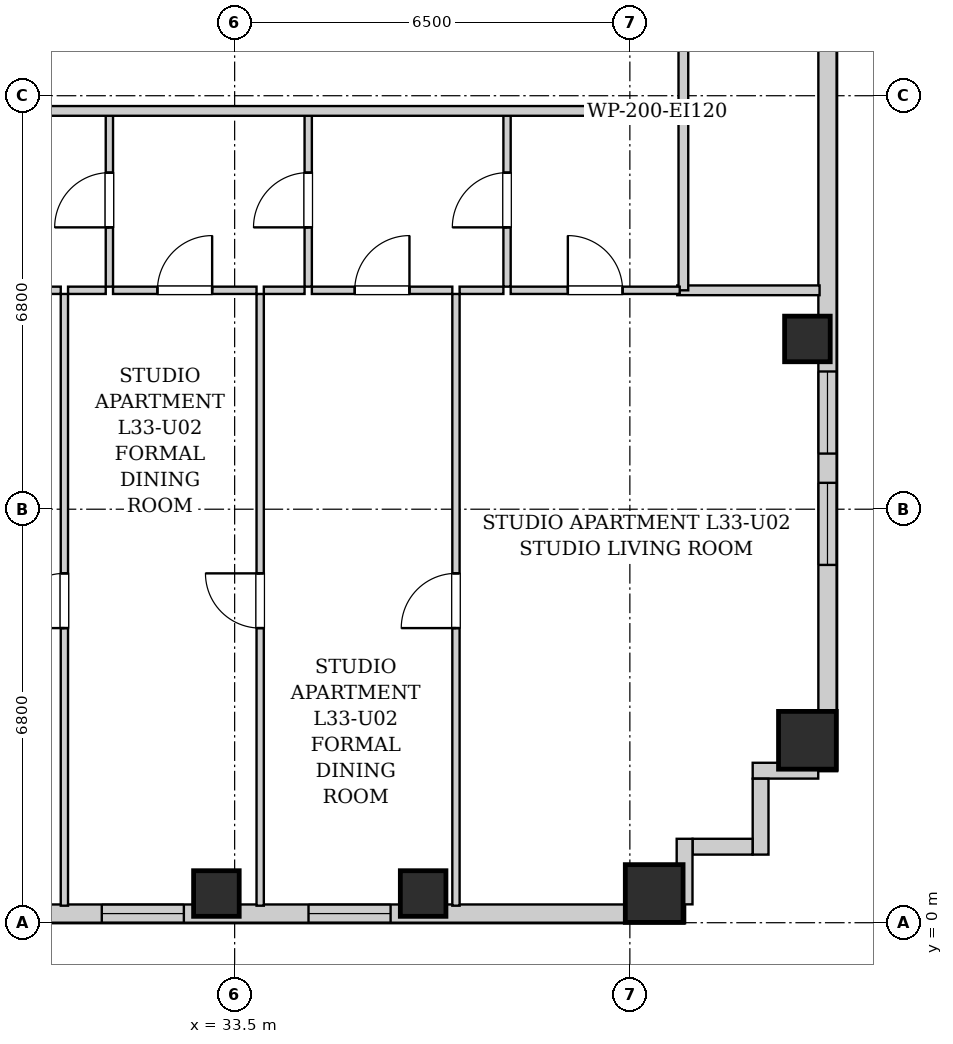
"""IFC4 building model, lengths in metres.
Left out: names, types, materials, properties, quantities, classifications, styles, units other than length and angle.
Written with IfcOpenShell. Run it as: python <this file> out.ifc"""

import sys

from ifc_helpers import new_model, si_unit, direction, frame, frame_2d, origin, origin_2d, place, context, subcontext, project, spatial, rectangle, extrude, element, fill, save


model = new_model("IFC4")
c1 = context("Model", 3, precision=1e-05, world=origin(), true_north=direction((0.0, 1.0)))
c2 = subcontext(c1, "Body", "Model", "MODEL_VIEW")
j1 = project(units=[si_unit("LENGTHUNIT", "METRE"), si_unit("PLANEANGLEUNIT", "RADIAN")], contexts=[c1])
p1 = place(None, origin())
s1 = spatial("IfcSite", under=j1, at=p1, CompositionType="ELEMENT")
p2 = place(p1, origin())
s2 = spatial("IfcBuilding", under=s1, at=p2, CompositionType="ELEMENT")
p3 = place(p2, frame((0.0, 0.0, 116.7)))
s3 = spatial("IfcBuildingStorey", under=s2, at=p3, CompositionType="ELEMENT", Elevation=116.7)
for number, where, z_axis, x_axis in (
    (1, (33.2, 0.48, 0.0), (0.0, 0.0, 1.0), (1.0, 0.0, 0.0)),
    (2, (36.6, 0.48, 0.0), (0.0, 0.0, 1.0), (1.0, 0.0, 0.0)),
):
    element("IfcColumn", number, at=place(p3, frame(where, z_axis=z_axis, x_axis=x_axis)), inside=s3, PredefinedType="COLUMN", context=c2, shape_type="SweptSolid", body=[
        extrude(rectangle(XDim=0.75, YDim=0.75, at=origin_2d()), origin(), (0.0, 0.0, 1.0), 3.2),
    ])
for number, where, z_axis, x_axis in (
    (3, (40.4, 0.48, 0.0), (0.0, 0.0, 1.0), (1.0, 0.0, 0.0)),
    (4, (42.92, 3.0, 0.0), (0.0, 0.0, 1.0), (1.0, 0.0, 0.0)),
):
    element("IfcColumn", number, at=place(p3, frame(where, z_axis=z_axis, x_axis=x_axis)), inside=s3, PredefinedType="COLUMN", context=c2, shape_type="SweptSolid", body=[
        extrude(rectangle(XDim=0.95, YDim=0.95, at=origin_2d()), origin(), (0.0, 0.0, 1.0), 3.2),
    ])
p4 = place(p3, frame((42.92, 9.6, 0.0), z_axis=(0.0, 0.0, 1.0), x_axis=(1.0, 0.0, 0.0)))
e5 = element("IfcColumn", 5, at=p4, inside=s3, PredefinedType="COLUMN", context=c2, shape_type="SweptSolid", body=[
    extrude(rectangle(XDim=0.75, YDim=0.75, at=origin_2d()), origin(), (0.0, 0.0, 1.0), 3.2),
])
p5 = place(p3, frame((43.25, 24.6, 0.0), z_axis=(0.0, 0.0, 1.0), x_axis=(0.0, -1.0, 0.0)))
e6 = element("IfcWall", 6, at=p5, inside=s3, PredefinedType="SOLIDWALL", context=c2, shape_type="SweptSolid", body=[
    extrude(rectangle(XDim=22.1, YDim=0.3, at=frame_2d((11.05, 0.0))), origin(), (0.0, 0.0, 1.0), 2.88),
])
p6 = place(p5, frame((17.366, 0.0, 0.55)))
e7 = element("IfcOpeningElement", 7, at=p6, cuts=e6, PredefinedType="OPENING", context=c2, shape_type="SweptSolid", body=[
    extrude(rectangle(XDim=1.35, YDim=1.2, at=frame_2d((0.675, 0.6))), frame((0.0, 0.16, 0.0), z_axis=(0.0, -1.0, 0.0), x_axis=(1.0, 0.0, 0.0)), (0.0, 0.0, 1.0), 0.32),
])
p7 = place(p5, frame((15.535, 0.0, 0.55)))
e8 = element("IfcOpeningElement", 8, at=p7, cuts=e6, PredefinedType="OPENING", context=c2, shape_type="SweptSolid", body=[
    extrude(rectangle(XDim=1.35, YDim=1.2, at=frame_2d((0.675, 0.6))), frame((0.0, 0.16, 0.0), z_axis=(0.0, -1.0, 0.0), x_axis=(1.0, 0.0, 0.0)), (0.0, 0.0, 1.0), 0.32),
])
p8 = place(p5, frame((5.1, 0.0, 0.55)))
e9 = element("IfcOpeningElement", 9, at=p8, cuts=e6, PredefinedType="OPENING", context=c2, shape_type="SweptSolid", body=[
    extrude(rectangle(XDim=1.35, YDim=1.2, at=frame_2d((0.675, 0.6))), frame((0.0, 0.16, 0.0), z_axis=(0.0, -1.0, 0.0), x_axis=(1.0, 0.0, 0.0)), (0.0, 0.0, 1.0), 0.32),
])
p9 = place(p5, frame((6.71, 0.0, 0.55)))
e10 = element("IfcOpeningElement", 10, at=p9, cuts=e6, PredefinedType="OPENING", context=c2, shape_type="SweptSolid", body=[
    extrude(rectangle(XDim=1.35, YDim=1.2, at=frame_2d((0.675, 0.6))), frame((0.0, 0.16, 0.0), z_axis=(0.0, -1.0, 0.0), x_axis=(1.0, 0.0, 0.0)), (0.0, 0.0, 1.0), 0.32),
])
p10 = place(p3, frame((40.9, 0.15, 0.0), z_axis=(0.0, 0.0, 1.0), x_axis=(-1.0, 0.0, 0.0)))
e11 = element("IfcWall", 11, at=p10, inside=s3, PredefinedType="SOLIDWALL", context=c2, shape_type="SweptSolid", body=[
    extrude(rectangle(XDim=21.95, YDim=0.3, at=frame_2d((10.975, 0.0))), origin(), (0.0, 0.0, 1.0), 2.88),
])
p11 = place(p10, frame((20.08, 0.0, 0.55)))
e12 = element("IfcOpeningElement", 12, at=p11, cuts=e11, PredefinedType="OPENING", context=c2, shape_type="SweptSolid", body=[
    extrude(rectangle(XDim=1.35, YDim=1.2, at=frame_2d((0.675, 0.6))), frame((0.0, 0.16, 0.0), z_axis=(0.0, -1.0, 0.0), x_axis=(1.0, 0.0, 0.0)), (0.0, 0.0, 1.0), 0.32),
])
p12 = place(p10, frame((18.4, 0.0, 0.55)))
e13 = element("IfcOpeningElement", 13, at=p12, cuts=e11, PredefinedType="OPENING", context=c2, shape_type="SweptSolid", body=[
    extrude(rectangle(XDim=0.85, YDim=1.2, at=frame_2d((0.425, 0.6))), frame((0.0, 0.16, 0.0), z_axis=(0.0, -1.0, 0.0), x_axis=(1.0, 0.0, 0.0)), (0.0, 0.0, 1.0), 0.32),
])
p13 = place(p10, frame((11.127, 0.0, 0.55)))
e14 = element("IfcOpeningElement", 14, at=p13, cuts=e11, PredefinedType="OPENING", context=c2, shape_type="SweptSolid", body=[
    extrude(rectangle(XDim=1.35, YDim=1.2, at=frame_2d((0.675, 0.6))), frame((0.0, 0.16, 0.0), z_axis=(0.0, -1.0, 0.0), x_axis=(1.0, 0.0, 0.0)), (0.0, 0.0, 1.0), 0.32),
])
p14 = place(p10, frame((8.235, 0.0, 0.55)))
e15 = element("IfcOpeningElement", 15, at=p14, cuts=e11, PredefinedType="OPENING", context=c2, shape_type="SweptSolid", body=[
    extrude(rectangle(XDim=1.35, YDim=1.2, at=frame_2d((0.675, 0.6))), frame((0.0, 0.16, 0.0), z_axis=(0.0, -1.0, 0.0), x_axis=(1.0, 0.0, 0.0)), (0.0, 0.0, 1.0), 0.32),
])
p15 = place(p10, frame((4.835, 0.0, 0.55)))
e16 = element("IfcOpeningElement", 16, at=p15, cuts=e11, PredefinedType="OPENING", context=c2, shape_type="SweptSolid", body=[
    extrude(rectangle(XDim=1.35, YDim=1.2, at=frame_2d((0.675, 0.6))), frame((0.0, 0.16, 0.0), z_axis=(0.0, -1.0, 0.0), x_axis=(1.0, 0.0, 0.0)), (0.0, 0.0, 1.0), 0.32),
])
p16 = place(p3, frame((43.098, 2.5, 0.0), z_axis=(0.0, 0.0, 1.0), x_axis=(-1.0, 0.0, 0.0)))
e17 = element("IfcWall", 17, at=p16, inside=s3, PredefinedType="SOLIDWALL", context=c2, shape_type="SweptSolid", body=[
    extrude(rectangle(XDim=1.078, YDim=0.26, at=frame_2d((0.539, 0.0))), origin(), (0.0, 0.0, 1.0), 2.88),
])
p17 = place(p3, frame((42.15, 2.368, 0.0), z_axis=(0.0, 0.0, 1.0), x_axis=(0.0, -1.0, 0.0)))
e18 = element("IfcWall", 18, at=p17, inside=s3, PredefinedType="SOLIDWALL", context=c2, shape_type="SweptSolid", body=[
    extrude(rectangle(XDim=1.248, YDim=0.26, at=frame_2d((0.624, 0.0))), origin(), (0.0, 0.0, 1.0), 2.88),
])
p18 = place(p3, frame((42.018, 1.25, 0.0), z_axis=(0.0, 0.0, 1.0), x_axis=(-1.0, 0.0, 0.0)))
e19 = element("IfcWall", 19, at=p18, inside=s3, PredefinedType="SOLIDWALL", context=c2, shape_type="SweptSolid", body=[
    extrude(rectangle(XDim=0.986, YDim=0.26, at=frame_2d((0.493, 0.0))), origin(), (0.0, 0.0, 1.0), 2.88),
])
p19 = place(p3, frame((40.9, 1.38, 0.0), z_axis=(0.0, 0.0, 1.0), x_axis=(0.0, -1.0, 0.0)))
e20 = element("IfcWall", 20, at=p19, inside=s3, PredefinedType="SOLIDWALL", context=c2, shape_type="SweptSolid", body=[
    extrude(rectangle(XDim=1.078, YDim=0.26, at=frame_2d((0.539, 0.0))), origin(), (0.0, 0.0, 1.0), 2.88),
])
p20 = place(p3, frame((40.88, 13.35, 0.0), z_axis=(0.0, 0.0, 1.0), x_axis=(0.0, 1.0, 0.0)))
e21 = element("IfcWall", 21, at=p20, inside=s3, PredefinedType="PARTITIONING", context=c2, shape_type="SweptSolid", body=[
    extrude(rectangle(XDim=1.74, YDim=0.16, at=frame_2d((0.87, 0.0))), origin(), (0.0, 0.0, 1.0), 2.88),
])
p21 = place(p3, frame((40.78, 10.4, 0.0), z_axis=(0.0, 0.0, 1.0), x_axis=(1.0, 0.0, 0.0)))
e22 = element("IfcWall", 22, at=p21, inside=s3, PredefinedType="PARTITIONING", context=c2, shape_type="SweptSolid", body=[
    extrude(rectangle(XDim=2.34, YDim=0.16, at=frame_2d((1.17, 0.0))), origin(), (0.0, 0.0, 1.0), 2.88),
])
p22 = place(p3, frame((40.88, 10.4, 0.0), z_axis=(0.0, 0.0, 1.0), x_axis=(0.0, 1.0, 0.0)))
e23 = element("IfcWall", 23, at=p22, inside=s3, PredefinedType="PARTITIONING", context=c2, shape_type="SweptSolid", body=[
    extrude(rectangle(XDim=2.91, YDim=0.16, at=frame_2d((1.455, 0.0))), origin(), (0.0, 0.0, 1.0), 2.88),
])
p23 = place(p3, frame((31.44, 10.46, 0.0), z_axis=(0.0, 0.0, 1.0), x_axis=(0.0, 1.0, 0.0)))
e24 = element("IfcWall", 24, at=p23, inside=s3, PredefinedType="PARTITIONING", context=c2, shape_type="SweptSolid", body=[
    extrude(rectangle(XDim=2.85, YDim=0.12, at=frame_2d((1.425, 0.0))), origin(), (0.0, 0.0, 1.0), 2.88),
])
p24 = place(p23, frame((0.975, 0.0, 0.0)))
e25 = element("IfcOpeningElement", 25, at=p24, cuts=e24, PredefinedType="OPENING", context=c2, shape_type="SweptSolid", body=[
    extrude(rectangle(XDim=0.9, YDim=2.05, at=frame_2d((0.45, 1.025))), frame((0.0, 0.07, 0.0), z_axis=(0.0, -1.0, 0.0), x_axis=(1.0, 0.0, 0.0)), (0.0, 0.0, 1.0), 0.14),
])
p25 = place(p3, frame((28.23, 10.4, 0.0), z_axis=(0.0, 0.0, 1.0), x_axis=(1.0, 0.0, 0.0)))
e26 = element("IfcWall", 26, at=p25, inside=s3, PredefinedType="PARTITIONING", context=c2, shape_type="SweptSolid", body=[
    extrude(rectangle(XDim=2.41, YDim=0.12, at=frame_2d((1.205, 0.0))), origin(), (0.0, 0.0, 1.0), 2.88),
])
p26 = place(p25, frame((0.755, 0.0, 0.0)))
e27 = element("IfcOpeningElement", 27, at=p26, cuts=e26, PredefinedType="OPENING", context=c2, shape_type="SweptSolid", body=[
    extrude(rectangle(XDim=0.9, YDim=2.05, at=frame_2d((0.45, 1.025))), frame((0.0, 0.07, 0.0), z_axis=(0.0, -1.0, 0.0), x_axis=(1.0, 0.0, 0.0)), (0.0, 0.0, 1.0), 0.14),
])
p27 = place(p3, frame((30.76, 10.4, 0.0), z_axis=(0.0, 0.0, 1.0), x_axis=(1.0, 0.0, 0.0)))
e28 = element("IfcWall", 28, at=p27, inside=s3, PredefinedType="PARTITIONING", context=c2, shape_type="SweptSolid", body=[
    extrude(rectangle(XDim=0.62, YDim=0.12, at=frame_2d((0.31, 0.0))), origin(), (0.0, 0.0, 1.0), 2.88),
])
p28 = place(p3, frame((34.71, 10.46, 0.0), z_axis=(0.0, 0.0, 1.0), x_axis=(0.0, 1.0, 0.0)))
e29 = element("IfcWall", 29, at=p28, inside=s3, PredefinedType="PARTITIONING", context=c2, shape_type="SweptSolid", body=[
    extrude(rectangle(XDim=2.85, YDim=0.12, at=frame_2d((1.425, 0.0))), origin(), (0.0, 0.0, 1.0), 2.88),
])
p29 = place(p28, frame((0.975, 0.0, 0.0)))
e30 = element("IfcOpeningElement", 30, at=p29, cuts=e29, PredefinedType="OPENING", context=c2, shape_type="SweptSolid", body=[
    extrude(rectangle(XDim=0.9, YDim=2.05, at=frame_2d((0.45, 1.025))), frame((0.0, 0.07, 0.0), z_axis=(0.0, -1.0, 0.0), x_axis=(1.0, 0.0, 0.0)), (0.0, 0.0, 1.0), 0.14),
])
p30 = place(p3, frame((31.5, 10.4, 0.0), z_axis=(0.0, 0.0, 1.0), x_axis=(1.0, 0.0, 0.0)))
e31 = element("IfcWall", 31, at=p30, inside=s3, PredefinedType="PARTITIONING", context=c2, shape_type="SweptSolid", body=[
    extrude(rectangle(XDim=2.36, YDim=0.12, at=frame_2d((1.18, 0.0))), origin(), (0.0, 0.0, 1.0), 2.88),
])
p31 = place(p30, frame((0.73, 0.0, 0.0)))
e32 = element("IfcOpeningElement", 32, at=p31, cuts=e31, PredefinedType="OPENING", context=c2, shape_type="SweptSolid", body=[
    extrude(rectangle(XDim=0.9, YDim=2.05, at=frame_2d((0.45, 1.025))), frame((0.0, 0.07, 0.0), z_axis=(0.0, -1.0, 0.0), x_axis=(1.0, 0.0, 0.0)), (0.0, 0.0, 1.0), 0.14),
])
p32 = place(p3, frame((33.98, 10.4, 0.0), z_axis=(0.0, 0.0, 1.0), x_axis=(1.0, 0.0, 0.0)))
e33 = element("IfcWall", 33, at=p32, inside=s3, PredefinedType="PARTITIONING", context=c2, shape_type="SweptSolid", body=[
    extrude(rectangle(XDim=0.67, YDim=0.12, at=frame_2d((0.335, 0.0))), origin(), (0.0, 0.0, 1.0), 2.88),
])
p33 = place(p3, frame((37.98, 10.46, 0.0), z_axis=(0.0, 0.0, 1.0), x_axis=(0.0, 1.0, 0.0)))
e34 = element("IfcWall", 34, at=p33, inside=s3, PredefinedType="PARTITIONING", context=c2, shape_type="SweptSolid", body=[
    extrude(rectangle(XDim=2.85, YDim=0.12, at=frame_2d((1.425, 0.0))), origin(), (0.0, 0.0, 1.0), 2.88),
])
p34 = place(p33, frame((0.975, 0.0, 0.0)))
e35 = element("IfcOpeningElement", 35, at=p34, cuts=e34, PredefinedType="OPENING", context=c2, shape_type="SweptSolid", body=[
    extrude(rectangle(XDim=0.9, YDim=2.05, at=frame_2d((0.45, 1.025))), frame((0.0, 0.07, 0.0), z_axis=(0.0, -1.0, 0.0), x_axis=(1.0, 0.0, 0.0)), (0.0, 0.0, 1.0), 0.14),
])
p35 = place(p3, frame((34.77, 10.4, 0.0), z_axis=(0.0, 0.0, 1.0), x_axis=(1.0, 0.0, 0.0)))
e36 = element("IfcWall", 36, at=p35, inside=s3, PredefinedType="PARTITIONING", context=c2, shape_type="SweptSolid", body=[
    extrude(rectangle(XDim=2.31, YDim=0.12, at=frame_2d((1.155, 0.0))), origin(), (0.0, 0.0, 1.0), 2.88),
])
p36 = place(p35, frame((0.705, 0.0, 0.0)))
e37 = element("IfcOpeningElement", 37, at=p36, cuts=e36, PredefinedType="OPENING", context=c2, shape_type="SweptSolid", body=[
    extrude(rectangle(XDim=0.9, YDim=2.05, at=frame_2d((0.45, 1.025))), frame((0.0, 0.07, 0.0), z_axis=(0.0, -1.0, 0.0), x_axis=(1.0, 0.0, 0.0)), (0.0, 0.0, 1.0), 0.14),
])
p37 = place(p3, frame((37.2, 10.4, 0.0), z_axis=(0.0, 0.0, 1.0), x_axis=(1.0, 0.0, 0.0)))
e38 = element("IfcWall", 38, at=p37, inside=s3, PredefinedType="PARTITIONING", context=c2, shape_type="SweptSolid", body=[
    extrude(rectangle(XDim=0.72, YDim=0.12, at=frame_2d((0.36, 0.0))), origin(), (0.0, 0.0, 1.0), 2.88),
])
p38 = place(p3, frame((38.04, 10.4, 0.0), z_axis=(0.0, 0.0, 1.0), x_axis=(1.0, 0.0, 0.0)))
e39 = element("IfcWall", 39, at=p38, inside=s3, PredefinedType="PARTITIONING", context=c2, shape_type="SweptSolid", body=[
    extrude(rectangle(XDim=2.78, YDim=0.12, at=frame_2d((1.39, 0.0))), origin(), (0.0, 0.0, 1.0), 2.88),
])
p39 = place(p38, frame((0.94, 0.0, 0.0)))
e40 = element("IfcOpeningElement", 40, at=p39, cuts=e39, PredefinedType="OPENING", context=c2, shape_type="SweptSolid", body=[
    extrude(rectangle(XDim=0.9, YDim=2.05, at=frame_2d((0.45, 1.025))), frame((0.0, 0.07, 0.0), z_axis=(0.0, -1.0, 0.0), x_axis=(1.0, 0.0, 0.0)), (0.0, 0.0, 1.0), 0.14),
])
p40 = place(p3, frame((30.7, 0.28, 0.0), z_axis=(0.0, 0.0, 1.0), x_axis=(0.0, 1.0, 0.0)))
e41 = element("IfcWall", 41, at=p40, inside=s3, PredefinedType="PARTITIONING", context=c2, shape_type="SweptSolid", body=[
    extrude(rectangle(XDim=10.06, YDim=0.12, at=frame_2d((5.03, 0.0))), origin(), (0.0, 0.0, 1.0), 2.88),
])
p41 = place(p40, frame((4.565, 0.0, 0.0)))
e42 = element("IfcOpeningElement", 42, at=p41, cuts=e41, PredefinedType="OPENING", context=c2, shape_type="SweptSolid", body=[
    extrude(rectangle(XDim=0.9, YDim=2.05, at=frame_2d((0.45, 1.025))), frame((0.0, 0.07, 0.0), z_axis=(0.0, -1.0, 0.0), x_axis=(1.0, 0.0, 0.0)), (0.0, 0.0, 1.0), 0.14),
])
p42 = place(p3, frame((33.92, 0.28, 0.0), z_axis=(0.0, 0.0, 1.0), x_axis=(0.0, 1.0, 0.0)))
e43 = element("IfcWall", 43, at=p42, inside=s3, PredefinedType="PARTITIONING", context=c2, shape_type="SweptSolid", body=[
    extrude(rectangle(XDim=10.06, YDim=0.12, at=frame_2d((5.03, 0.0))), origin(), (0.0, 0.0, 1.0), 2.88),
])
p43 = place(p42, frame((4.565, 0.0, 0.0)))
e44 = element("IfcOpeningElement", 44, at=p43, cuts=e43, PredefinedType="OPENING", context=c2, shape_type="SweptSolid", body=[
    extrude(rectangle(XDim=0.9, YDim=2.05, at=frame_2d((0.45, 1.025))), frame((0.0, 0.07, 0.0), z_axis=(0.0, -1.0, 0.0), x_axis=(1.0, 0.0, 0.0)), (0.0, 0.0, 1.0), 0.14),
])
p44 = place(p3, frame((37.14, 0.28, 0.0), z_axis=(0.0, 0.0, 1.0), x_axis=(0.0, 1.0, 0.0)))
e45 = element("IfcWall", 45, at=p44, inside=s3, PredefinedType="PARTITIONING", context=c2, shape_type="SweptSolid", body=[
    extrude(rectangle(XDim=10.06, YDim=0.12, at=frame_2d((5.03, 0.0))), origin(), (0.0, 0.0, 1.0), 2.88),
])
p45 = place(p44, frame((4.565, 0.0, 0.0)))
e46 = element("IfcOpeningElement", 46, at=p45, cuts=e45, PredefinedType="OPENING", context=c2, shape_type="SweptSolid", body=[
    extrude(rectangle(XDim=0.9, YDim=2.05, at=frame_2d((0.45, 1.025))), frame((0.0, 0.07, 0.0), z_axis=(0.0, -1.0, 0.0), x_axis=(1.0, 0.0, 0.0)), (0.0, 0.0, 1.0), 0.14),
])
p46 = place(p3, frame((10.05, 13.35, 0.0), z_axis=(0.0, 0.0, 1.0), x_axis=(1.0, 0.0, 0.0)))
e47 = element("IfcWall", 47, at=p46, inside=s3, PredefinedType="PARTITIONING", context=c2, shape_type="SweptSolid", body=[
    extrude(rectangle(XDim=30.8, YDim=0.16, at=frame_2d((15.4, 0.0))), origin(), (0.0, 0.0, 1.0), 2.88),
])
p47 = place(p46, frame((3.692, 0.0, 0.0)))
e48 = element("IfcOpeningElement", 48, at=p47, cuts=e47, PredefinedType="OPENING", context=c2, shape_type="SweptSolid", body=[
    extrude(rectangle(XDim=0.95, YDim=2.1, at=frame_2d((0.475, 1.05))), frame((0.0, 0.09, 0.0), z_axis=(0.0, -1.0, 0.0), x_axis=(1.0, 0.0, 0.0)), (0.0, 0.0, 1.0), 0.18),
])
p48 = place(p46, frame((12.095, 0.0, 0.0)))
e49 = element("IfcOpeningElement", 49, at=p48, cuts=e47, PredefinedType="OPENING", context=c2, shape_type="SweptSolid", body=[
    extrude(rectangle(XDim=0.95, YDim=2.1, at=frame_2d((0.475, 1.05))), frame((0.0, 0.09, 0.0), z_axis=(0.0, -1.0, 0.0), x_axis=(1.0, 0.0, 0.0)), (0.0, 0.0, 1.0), 0.18),
])
p49 = place(p24, origin())
e50 = element("IfcDoor", 50, at=p49, inside=s3, OperationType="SINGLE_SWING_LEFT", PredefinedType="DOOR", context=c2, shape_type="SweptSolid", body=[
    extrude(rectangle(XDim=0.9, YDim=2.05, at=frame_2d((0.45, 1.025))), frame((0.0, 0.025, 0.0), z_axis=(0.0, -1.0, 0.0), x_axis=(1.0, 0.0, 0.0)), (0.0, 0.0, 1.0), 0.05),
])
fill(e25, e50)
p50 = place(p29, origin())
e51 = element("IfcDoor", 51, at=p50, inside=s3, OperationType="SINGLE_SWING_LEFT", PredefinedType="DOOR", context=c2, shape_type="SweptSolid", body=[
    extrude(rectangle(XDim=0.9, YDim=2.05, at=frame_2d((0.45, 1.025))), frame((0.0, 0.025, 0.0), z_axis=(0.0, -1.0, 0.0), x_axis=(1.0, 0.0, 0.0)), (0.0, 0.0, 1.0), 0.05),
])
fill(e30, e51)
p51 = place(p31, origin())
e52 = element("IfcDoor", 52, at=p51, inside=s3, OperationType="SINGLE_SWING_RIGHT", PredefinedType="DOOR", context=c2, shape_type="SweptSolid", body=[
    extrude(rectangle(XDim=0.9, YDim=2.05, at=frame_2d((0.45, 1.025))), frame((0.0, 0.025, 0.0), z_axis=(0.0, -1.0, 0.0), x_axis=(1.0, 0.0, 0.0)), (0.0, 0.0, 1.0), 0.05),
])
fill(e32, e52)
p52 = place(p34, origin())
e53 = element("IfcDoor", 53, at=p52, inside=s3, OperationType="SINGLE_SWING_LEFT", PredefinedType="DOOR", context=c2, shape_type="SweptSolid", body=[
    extrude(rectangle(XDim=0.9, YDim=2.05, at=frame_2d((0.45, 1.025))), frame((0.0, 0.025, 0.0), z_axis=(0.0, -1.0, 0.0), x_axis=(1.0, 0.0, 0.0)), (0.0, 0.0, 1.0), 0.05),
])
fill(e35, e53)
p53 = place(p36, origin())
e54 = element("IfcDoor", 54, at=p53, inside=s3, OperationType="SINGLE_SWING_RIGHT", PredefinedType="DOOR", context=c2, shape_type="SweptSolid", body=[
    extrude(rectangle(XDim=0.9, YDim=2.05, at=frame_2d((0.45, 1.025))), frame((0.0, 0.025, 0.0), z_axis=(0.0, -1.0, 0.0), x_axis=(1.0, 0.0, 0.0)), (0.0, 0.0, 1.0), 0.05),
])
fill(e37, e54)
p54 = place(p39, origin())
e55 = element("IfcDoor", 55, at=p54, inside=s3, OperationType="SINGLE_SWING_LEFT", PredefinedType="DOOR", context=c2, shape_type="SweptSolid", body=[
    extrude(rectangle(XDim=0.9, YDim=2.05, at=frame_2d((0.45, 1.025))), frame((0.0, 0.025, 0.0), z_axis=(0.0, -1.0, 0.0), x_axis=(1.0, 0.0, 0.0)), (0.0, 0.0, 1.0), 0.05),
])
fill(e40, e55)
p55 = place(p41, origin())
e56 = element("IfcDoor", 56, at=p55, inside=s3, OperationType="SINGLE_SWING_LEFT", PredefinedType="DOOR", context=c2, shape_type="SweptSolid", body=[
    extrude(rectangle(XDim=0.9, YDim=2.05, at=frame_2d((0.45, 1.025))), frame((0.0, 0.025, 0.0), z_axis=(0.0, -1.0, 0.0), x_axis=(1.0, 0.0, 0.0)), (0.0, 0.0, 1.0), 0.05),
])
fill(e42, e56)
p56 = place(p43, origin())
e57 = element("IfcDoor", 57, at=p56, inside=s3, OperationType="SINGLE_SWING_RIGHT", PredefinedType="DOOR", context=c2, shape_type="SweptSolid", body=[
    extrude(rectangle(XDim=0.9, YDim=2.05, at=frame_2d((0.45, 1.025))), frame((0.0, 0.025, 0.0), z_axis=(0.0, -1.0, 0.0), x_axis=(1.0, 0.0, 0.0)), (0.0, 0.0, 1.0), 0.05),
])
fill(e44, e57)
p57 = place(p45, origin())
e58 = element("IfcDoor", 58, at=p57, inside=s3, OperationType="SINGLE_SWING_LEFT", PredefinedType="DOOR", context=c2, shape_type="SweptSolid", body=[
    extrude(rectangle(XDim=0.9, YDim=2.05, at=frame_2d((0.45, 1.025))), frame((0.0, 0.025, 0.0), z_axis=(0.0, -1.0, 0.0), x_axis=(1.0, 0.0, 0.0)), (0.0, 0.0, 1.0), 0.05),
])
fill(e46, e58)
p58 = place(p14, origin())
e59 = element("IfcWindow", 59, at=p58, inside=s3, PartitioningType="SINGLE_PANEL", PredefinedType="WINDOW", context=c2, shape_type="SweptSolid", body=[
    extrude(rectangle(XDim=1.35, YDim=1.2, at=frame_2d((0.675, 0.6))), frame((0.0, 0.03, 0.0), z_axis=(0.0, -1.0, 0.0), x_axis=(1.0, 0.0, 0.0)), (0.0, 0.0, 1.0), 0.06),
])
fill(e15, e59)
p59 = place(p15, origin())
e60 = element("IfcWindow", 60, at=p59, inside=s3, PartitioningType="SINGLE_PANEL", PredefinedType="WINDOW", context=c2, shape_type="SweptSolid", body=[
    extrude(rectangle(XDim=1.35, YDim=1.2, at=frame_2d((0.675, 0.6))), frame((0.0, 0.03, 0.0), z_axis=(0.0, -1.0, 0.0), x_axis=(1.0, 0.0, 0.0)), (0.0, 0.0, 1.0), 0.06),
])
fill(e16, e60)
p60 = place(p6, origin())
e61 = element("IfcWindow", 61, at=p60, inside=s3, PartitioningType="SINGLE_PANEL", PredefinedType="WINDOW", context=c2, shape_type="SweptSolid", body=[
    extrude(rectangle(XDim=1.35, YDim=1.2, at=frame_2d((0.675, 0.6))), frame((0.0, 0.03, 0.0), z_axis=(0.0, -1.0, 0.0), x_axis=(1.0, 0.0, 0.0)), (0.0, 0.0, 1.0), 0.06),
])
fill(e7, e61)
p61 = place(p7, origin())
e62 = element("IfcWindow", 62, at=p61, inside=s3, PartitioningType="SINGLE_PANEL", PredefinedType="WINDOW", context=c2, shape_type="SweptSolid", body=[
    extrude(rectangle(XDim=1.35, YDim=1.2, at=frame_2d((0.675, 0.6))), frame((0.0, 0.03, 0.0), z_axis=(0.0, -1.0, 0.0), x_axis=(1.0, 0.0, 0.0)), (0.0, 0.0, 1.0), 0.06),
])
fill(e8, e62)
save(model, sys.argv[1])
